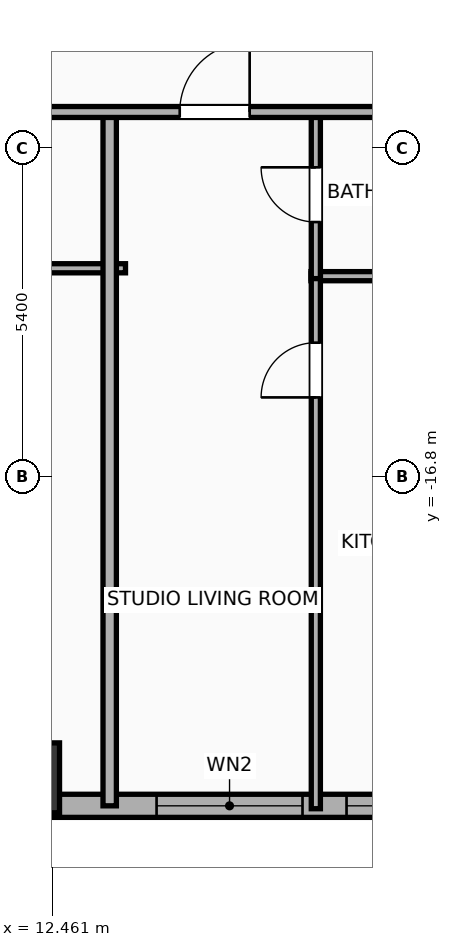
"""IFC4 building model, lengths in metres.
Left out: names, types, materials, properties, quantities, classifications, styles, units other than length and angle.
Written with IfcOpenShell. Run it as: python <this file> out.ifc"""

import sys

from ifc_helpers import new_model, si_unit, direction, frame, frame_2d, origin, origin_2d, place, context, subcontext, project, spatial, rectangle, hollow_rectangle, extrude, element, fill, save


model = new_model("IFC4")
c1 = context("Model", 3, precision=1e-05, world=origin(), true_north=direction((0.0, 1.0)))
c2 = subcontext(c1, "Body", "Model", "MODEL_VIEW")
j1 = project(units=[si_unit("LENGTHUNIT", "METRE"), si_unit("PLANEANGLEUNIT", "RADIAN")], contexts=[c1])
p1 = place(None, origin())
s1 = spatial("IfcSite", under=j1, at=p1, CompositionType="ELEMENT")
p2 = place(p1, origin())
s2 = spatial("IfcBuilding", under=s1, at=p2, CompositionType="ELEMENT")
p3 = place(p2, frame((0.0, 0.0, 29.9)))
s3 = spatial("IfcBuildingStorey", under=s2, at=p3, CompositionType="ELEMENT", Elevation=29.9)
p4 = place(p3, frame((12.0, -21.75, 0.0), z_axis=(0.0, 0.0, 1.0), x_axis=(1.0, 0.0, 0.0)))
e1 = element("IfcColumn", 1, at=p4, inside=s3, PredefinedType="COLUMN", context=c2, shape_type="SweptSolid", body=[
    extrude(hollow_rectangle(XDim=1.15, YDim=1.15, WallThickness=0.04, at=origin_2d()), origin(), (0.0, 0.0, 1.0), 3.9),
])
p5 = place(p3, frame((22.381, -22.21, 0.0), z_axis=(0.0, 0.0, 1.0), x_axis=(-1.0, 0.0, 0.0)))
e2 = element("IfcWall", 2, at=p5, inside=s3, PredefinedType="ELEMENTEDWALL", context=c2, shape_type="SweptSolid", body=[
    extrude(rectangle(XDim=51.963, YDim=0.38, at=frame_2d((25.981, 0.0))), origin(), (0.0, 0.0, 1.0), 2.54),
])
p6 = place(p5, frame((5.81, 0.0, 0.75)))
e3 = element("IfcOpeningElement", 3, at=p6, cuts=e2, PredefinedType="OPENING", context=c2, shape_type="SweptSolid", body=[
    extrude(rectangle(XDim=2.4, YDim=1.63, at=frame_2d((1.2, 0.815))), frame((0.0, 0.2, 0.0), z_axis=(0.0, -1.0, 0.0), x_axis=(1.0, 0.0, 0.0)), (0.0, 0.0, 1.0), 0.4),
])
p7 = place(p5, frame((26.431, 0.0, 0.75)))
e4 = element("IfcOpeningElement", 4, at=p7, cuts=e2, PredefinedType="OPENING", context=c2, shape_type="SweptSolid", body=[
    extrude(rectangle(XDim=2.4, YDim=1.63, at=frame_2d((1.2, 0.815))), frame((0.0, 0.2, 0.0), z_axis=(0.0, -1.0, 0.0), x_axis=(1.0, 0.0, 0.0)), (0.0, 0.0, 1.0), 0.4),
])
p8 = place(p5, frame((42.952, 0.0, 0.75)))
e5 = element("IfcOpeningElement", 5, at=p8, cuts=e2, PredefinedType="OPENING", context=c2, shape_type="SweptSolid", body=[
    extrude(rectangle(XDim=2.4, YDim=1.63, at=frame_2d((1.2, 0.815))), frame((0.0, 0.2, 0.0), z_axis=(0.0, -1.0, 0.0), x_axis=(1.0, 0.0, 0.0)), (0.0, 0.0, 1.0), 0.4),
])
p9 = place(p5, frame((49.027, 0.0, 0.75)))
e6 = element("IfcOpeningElement", 6, at=p9, cuts=e2, PredefinedType="OPENING", context=c2, shape_type="SweptSolid", body=[
    extrude(rectangle(XDim=1.2, YDim=1.63, at=frame_2d((0.6, 0.815))), frame((0.0, 0.2, 0.0), z_axis=(0.0, -1.0, 0.0), x_axis=(1.0, 0.0, 0.0)), (0.0, 0.0, 1.0), 0.4),
])
p10 = place(p5, frame((46.476, 0.0, 0.75)))
e7 = element("IfcOpeningElement", 7, at=p10, cuts=e2, PredefinedType="OPENING", context=c2, shape_type="SweptSolid", body=[
    extrude(rectangle(XDim=1.2, YDim=1.63, at=frame_2d((0.6, 0.815))), frame((0.0, 0.2, 0.0), z_axis=(0.0, -1.0, 0.0), x_axis=(1.0, 0.0, 0.0)), (0.0, 0.0, 1.0), 0.4),
])
p11 = place(p5, frame((39.181, 0.0, 0.75)))
e8 = element("IfcOpeningElement", 8, at=p11, cuts=e2, PredefinedType="OPENING", context=c2, shape_type="SweptSolid", body=[
    extrude(rectangle(XDim=1.2, YDim=1.63, at=frame_2d((0.6, 0.815))), frame((0.0, 0.2, 0.0), z_axis=(0.0, -1.0, 0.0), x_axis=(1.0, 0.0, 0.0)), (0.0, 0.0, 1.0), 0.4),
])
p12 = place(p5, frame((32.476, 0.0, 0.75)))
e9 = element("IfcOpeningElement", 9, at=p12, cuts=e2, PredefinedType="OPENING", context=c2, shape_type="SweptSolid", body=[
    extrude(rectangle(XDim=1.2, YDim=1.63, at=frame_2d((0.6, 0.815))), frame((0.0, 0.2, 0.0), z_axis=(0.0, -1.0, 0.0), x_axis=(1.0, 0.0, 0.0)), (0.0, 0.0, 1.0), 0.4),
])
p13 = place(p5, frame((35.276, 0.0, 0.75)))
e10 = element("IfcOpeningElement", 10, at=p13, cuts=e2, PredefinedType="OPENING", context=c2, shape_type="SweptSolid", body=[
    extrude(rectangle(XDim=1.2, YDim=1.63, at=frame_2d((0.6, 0.815))), frame((0.0, 0.2, 0.0), z_axis=(0.0, -1.0, 0.0), x_axis=(1.0, 0.0, 0.0)), (0.0, 0.0, 1.0), 0.4),
])
p14 = place(p5, frame((29.491, 0.0, 0.75)))
e11 = element("IfcOpeningElement", 11, at=p14, cuts=e2, PredefinedType="OPENING", context=c2, shape_type="SweptSolid", body=[
    extrude(rectangle(XDim=0.85, YDim=1.63, at=frame_2d((0.425, 0.815))), frame((0.0, 0.2, 0.0), z_axis=(0.0, -1.0, 0.0), x_axis=(1.0, 0.0, 0.0)), (0.0, 0.0, 1.0), 0.4),
])
p15 = place(p5, frame((21.596, 0.0, 0.75)))
e12 = element("IfcOpeningElement", 12, at=p15, cuts=e2, PredefinedType="OPENING", context=c2, shape_type="SweptSolid", body=[
    extrude(rectangle(XDim=1.2, YDim=1.63, at=frame_2d((0.6, 0.815))), frame((0.0, 0.2, 0.0), z_axis=(0.0, -1.0, 0.0), x_axis=(1.0, 0.0, 0.0)), (0.0, 0.0, 1.0), 0.4),
])
p16 = place(p5, frame((24.036, 0.0, 0.75)))
e13 = element("IfcOpeningElement", 13, at=p16, cuts=e2, PredefinedType="OPENING", context=c2, shape_type="SweptSolid", body=[
    extrude(rectangle(XDim=1.2, YDim=1.63, at=frame_2d((0.6, 0.815))), frame((0.0, 0.2, 0.0), z_axis=(0.0, -1.0, 0.0), x_axis=(1.0, 0.0, 0.0)), (0.0, 0.0, 1.0), 0.4),
])
p17 = place(p5, frame((17.886, 0.0, 0.75)))
e14 = element("IfcOpeningElement", 14, at=p17, cuts=e2, PredefinedType="OPENING", context=c2, shape_type="SweptSolid", body=[
    extrude(rectangle(XDim=1.2, YDim=1.63, at=frame_2d((0.6, 0.815))), frame((0.0, 0.2, 0.0), z_axis=(0.0, -1.0, 0.0), x_axis=(1.0, 0.0, 0.0)), (0.0, 0.0, 1.0), 0.4),
])
p18 = place(p5, frame((15.086, 0.0, 0.75)))
e15 = element("IfcOpeningElement", 15, at=p18, cuts=e2, PredefinedType="OPENING", context=c2, shape_type="SweptSolid", body=[
    extrude(rectangle(XDim=1.2, YDim=1.63, at=frame_2d((0.6, 0.815))), frame((0.0, 0.2, 0.0), z_axis=(0.0, -1.0, 0.0), x_axis=(1.0, 0.0, 0.0)), (0.0, 0.0, 1.0), 0.4),
])
p19 = place(p5, frame((11.181, 0.0, 0.75)))
e16 = element("IfcOpeningElement", 16, at=p19, cuts=e2, PredefinedType="OPENING", context=c2, shape_type="SweptSolid", body=[
    extrude(rectangle(XDim=1.2, YDim=1.63, at=frame_2d((0.6, 0.815))), frame((0.0, 0.2, 0.0), z_axis=(0.0, -1.0, 0.0), x_axis=(1.0, 0.0, 0.0)), (0.0, 0.0, 1.0), 0.4),
])
p20 = place(p5, frame((3.886, 0.0, 0.75)))
e17 = element("IfcOpeningElement", 17, at=p20, cuts=e2, PredefinedType="OPENING", context=c2, shape_type="SweptSolid", body=[
    extrude(rectangle(XDim=1.2, YDim=1.63, at=frame_2d((0.6, 0.815))), frame((0.0, 0.2, 0.0), z_axis=(0.0, -1.0, 0.0), x_axis=(1.0, 0.0, 0.0)), (0.0, 0.0, 1.0), 0.4),
])
p21 = place(p5, frame((1.536, 0.0, 0.75)))
e18 = element("IfcOpeningElement", 18, at=p21, cuts=e2, PredefinedType="OPENING", context=c2, shape_type="SweptSolid", body=[
    extrude(rectangle(XDim=1.2, YDim=1.63, at=frame_2d((0.6, 0.815))), frame((0.0, 0.2, 0.0), z_axis=(0.0, -1.0, 0.0), x_axis=(1.0, 0.0, 0.0)), (0.0, 0.0, 1.0), 0.4),
])
p22 = place(p3, frame((11.417, -13.37, 0.0), z_axis=(0.0, 0.0, 1.0), x_axis=(1.0, 0.0, 0.0)))
e19 = element("IfcWall", 19, at=p22, inside=s3, PredefinedType="PLUMBINGWALL", context=c2, shape_type="SweptSolid", body=[
    extrude(rectangle(XDim=2.243, YDim=0.15, at=frame_2d((1.122, 0.0))), origin(), (0.0, 0.0, 1.0), 3.65),
])
p23 = place(p3, frame((13.4, -22.21, 0.0), z_axis=(0.0, 0.0, 1.0), x_axis=(0.0, 1.0, 0.0)))
e20 = element("IfcWall", 20, at=p23, inside=s3, PredefinedType="PARTITIONING", context=c2, shape_type="SweptSolid", body=[
    extrude(rectangle(XDim=11.49, YDim=0.22, at=frame_2d((5.745, 0.0))), origin(), (0.0, 0.0, 1.0), 3.65),
])
p24 = place(p3, frame((16.71, -13.5, 0.0), z_axis=(0.0, 0.0, 1.0), x_axis=(1.0, 0.0, 0.0)))
e21 = element("IfcWall", 21, at=p24, inside=s3, PredefinedType="PLUMBINGWALL", context=c2, shape_type="SweptSolid", body=[
    extrude(rectangle(XDim=2.55, YDim=0.15, at=frame_2d((1.275, 0.0))), origin(), (0.0, 0.0, 1.0), 3.65),
])
p25 = place(p3, frame((16.79, -22.258, 0.0), z_axis=(0.0, 0.0, 1.0), x_axis=(0.0, 1.0, 0.0)))
e22 = element("IfcWall", 22, at=p25, inside=s3, PredefinedType="PLUMBINGWALL", context=c2, shape_type="SweptSolid", body=[
    extrude(rectangle(XDim=8.798, YDim=0.15, at=frame_2d((4.399, 0.0))), origin(), (0.0, 0.0, 1.0), 3.65),
])
p26 = place(p25, frame((6.764, 0.0, 0.0)))
e23 = element("IfcOpeningElement", 23, at=p26, cuts=e22, PredefinedType="OPENING", context=c2, shape_type="SweptSolid", body=[
    extrude(rectangle(XDim=0.9, YDim=2.05, at=frame_2d((0.45, 1.025))), frame((0.0, 0.085, 0.0), z_axis=(0.0, -1.0, 0.0), x_axis=(1.0, 0.0, 0.0)), (0.0, 0.0, 1.0), 0.17),
])
p27 = place(p3, frame((16.79, -13.54, 0.0), z_axis=(0.0, 0.0, 1.0), x_axis=(0.0, 1.0, 0.0)))
e24 = element("IfcWall", 24, at=p27, inside=s3, PredefinedType="PLUMBINGWALL", context=c2, shape_type="SweptSolid", body=[
    extrude(rectangle(XDim=2.76, YDim=0.15, at=frame_2d((1.38, 0.0))), origin(), (0.0, 0.0, 1.0), 3.65),
])
p28 = place(p27, frame((0.93, 0.0, 0.0)))
e25 = element("IfcOpeningElement", 25, at=p28, cuts=e24, PredefinedType="OPENING", context=c2, shape_type="SweptSolid", body=[
    extrude(rectangle(XDim=0.9, YDim=2.05, at=frame_2d((0.45, 1.025))), frame((0.0, 0.085, 0.0), z_axis=(0.0, -1.0, 0.0), x_axis=(1.0, 0.0, 0.0)), (0.0, 0.0, 1.0), 0.17),
])
p29 = place(p3, frame((-33.41, -10.8, 0.0), z_axis=(0.0, 0.0, 1.0), x_axis=(1.0, 0.0, 0.0)))
e26 = element("IfcWall", 26, at=p29, inside=s3, PredefinedType="PARTITIONING", context=c2, shape_type="SweptSolid", body=[
    extrude(rectangle(XDim=59.62, YDim=0.18, at=frame_2d((29.81, 0.0))), origin(), (0.0, 0.0, 1.0), 3.65),
])
p30 = place(p29, frame((3.36, 0.0, 0.0)))
e27 = element("IfcOpeningElement", 27, at=p30, cuts=e26, PredefinedType="OPENING", context=c2, shape_type="SweptSolid", body=[
    extrude(rectangle(XDim=1.15, YDim=2.05, at=frame_2d((0.575, 1.025))), frame((0.0, 0.1, 0.0), z_axis=(0.0, -1.0, 0.0), x_axis=(1.0, 0.0, 0.0)), (0.0, 0.0, 1.0), 0.2),
])
p31 = place(p29, frame((10.908, 0.0, 0.0)))
e28 = element("IfcOpeningElement", 28, at=p31, cuts=e26, PredefinedType="OPENING", context=c2, shape_type="SweptSolid", body=[
    extrude(rectangle(XDim=1.15, YDim=2.05, at=frame_2d((0.575, 1.025))), frame((0.0, 0.1, 0.0), z_axis=(0.0, -1.0, 0.0), x_axis=(1.0, 0.0, 0.0)), (0.0, 0.0, 1.0), 0.2),
])
p32 = place(p29, frame((15.755, 0.0, 0.0)))
e29 = element("IfcOpeningElement", 29, at=p32, cuts=e26, PredefinedType="OPENING", context=c2, shape_type="SweptSolid", body=[
    extrude(rectangle(XDim=0.9, YDim=2.05, at=frame_2d((0.45, 1.025))), frame((0.0, 0.1, 0.0), z_axis=(0.0, -1.0, 0.0), x_axis=(1.0, 0.0, 0.0)), (0.0, 0.0, 1.0), 0.2),
])
p33 = place(p29, frame((22.11, 0.0, 0.0)))
e30 = element("IfcOpeningElement", 30, at=p33, cuts=e26, PredefinedType="OPENING", context=c2, shape_type="SweptSolid", body=[
    extrude(rectangle(XDim=1.15, YDim=2.05, at=frame_2d((0.575, 1.025))), frame((0.0, 0.1, 0.0), z_axis=(0.0, -1.0, 0.0), x_axis=(1.0, 0.0, 0.0)), (0.0, 0.0, 1.0), 0.2),
])
p34 = place(p29, frame((27.709, 0.0, 0.0)))
e31 = element("IfcOpeningElement", 31, at=p34, cuts=e26, PredefinedType="OPENING", context=c2, shape_type="SweptSolid", body=[
    extrude(rectangle(XDim=1.15, YDim=2.05, at=frame_2d((0.575, 1.025))), frame((0.0, 0.1, 0.0), z_axis=(0.0, -1.0, 0.0), x_axis=(1.0, 0.0, 0.0)), (0.0, 0.0, 1.0), 0.2),
])
p35 = place(p29, frame((33.349, 0.0, 0.0)))
e32 = element("IfcOpeningElement", 32, at=p35, cuts=e26, PredefinedType="OPENING", context=c2, shape_type="SweptSolid", body=[
    extrude(rectangle(XDim=1.15, YDim=2.05, at=frame_2d((0.575, 1.025))), frame((0.0, 0.1, 0.0), z_axis=(0.0, -1.0, 0.0), x_axis=(1.0, 0.0, 0.0)), (0.0, 0.0, 1.0), 0.2),
])
p36 = place(p29, frame((36.759, 0.0, 0.0)))
e33 = element("IfcOpeningElement", 33, at=p36, cuts=e26, PredefinedType="OPENING", context=c2, shape_type="SweptSolid", body=[
    extrude(rectangle(XDim=1.15, YDim=2.05, at=frame_2d((0.575, 1.025))), frame((0.0, 0.1, 0.0), z_axis=(0.0, -1.0, 0.0), x_axis=(1.0, 0.0, 0.0)), (0.0, 0.0, 1.0), 0.2),
])
p37 = place(p29, frame((43.752, 0.0, 0.0)))
e34 = element("IfcOpeningElement", 34, at=p37, cuts=e26, PredefinedType="OPENING", context=c2, shape_type="SweptSolid", body=[
    extrude(rectangle(XDim=0.9, YDim=2.05, at=frame_2d((0.45, 1.025))), frame((0.0, 0.1, 0.0), z_axis=(0.0, -1.0, 0.0), x_axis=(1.0, 0.0, 0.0)), (0.0, 0.0, 1.0), 0.2),
])
p38 = place(p29, frame((47.962, 0.0, 0.0)))
e35 = element("IfcOpeningElement", 35, at=p38, cuts=e26, PredefinedType="OPENING", context=c2, shape_type="SweptSolid", body=[
    extrude(rectangle(XDim=1.15, YDim=2.05, at=frame_2d((0.575, 1.025))), frame((0.0, 0.1, 0.0), z_axis=(0.0, -1.0, 0.0), x_axis=(1.0, 0.0, 0.0)), (0.0, 0.0, 1.0), 0.2),
])
p39 = place(p29, frame((55.641, 0.0, 0.0)))
e36 = element("IfcOpeningElement", 36, at=p39, cuts=e26, PredefinedType="OPENING", context=c2, shape_type="SweptSolid", body=[
    extrude(rectangle(XDim=1.15, YDim=2.05, at=frame_2d((0.575, 1.025))), frame((0.0, 0.1, 0.0), z_axis=(0.0, -1.0, 0.0), x_axis=(1.0, 0.0, 0.0)), (0.0, 0.0, 1.0), 0.2),
])
p40 = place(p6, origin())
e37 = element("IfcWindow", 37, at=p40, inside=s3, PartitioningType="SINGLE_PANEL", PredefinedType="WINDOW", context=c2, shape_type="SweptSolid", body=[
    extrude(rectangle(XDim=2.4, YDim=1.63, at=frame_2d((1.2, 0.815))), frame((0.0, 0.03, 0.0), z_axis=(0.0, -1.0, 0.0), x_axis=(1.0, 0.0, 0.0)), (0.0, 0.0, 1.0), 0.06),
])
fill(e3, e37)
p41 = place(p20, origin())
e38 = element("IfcWindow", 38, at=p41, inside=s3, PartitioningType="SINGLE_PANEL", PredefinedType="WINDOW", context=c2, shape_type="SweptSolid", body=[
    extrude(rectangle(XDim=1.2, YDim=1.63, at=frame_2d((0.6, 0.815))), frame((0.0, 0.03, 0.0), z_axis=(0.0, -1.0, 0.0), x_axis=(1.0, 0.0, 0.0)), (0.0, 0.0, 1.0), 0.06),
])
fill(e17, e38)
p42 = place(p26, origin())
e39 = element("IfcDoor", 39, at=p42, inside=s3, OperationType="SINGLE_SWING_LEFT", PredefinedType="DOOR", context=c2, shape_type="SweptSolid", body=[
    extrude(rectangle(XDim=0.9, YDim=2.05, at=frame_2d((0.45, 1.025))), frame((0.0, 0.025, 0.0), z_axis=(0.0, -1.0, 0.0), x_axis=(1.0, 0.0, 0.0)), (0.0, 0.0, 1.0), 0.05),
])
fill(e23, e39)
p43 = place(p28, origin())
e40 = element("IfcDoor", 40, at=p43, inside=s3, OperationType="SINGLE_SWING_RIGHT", PredefinedType="DOOR", context=c2, shape_type="SweptSolid", body=[
    extrude(rectangle(XDim=0.9, YDim=2.05, at=frame_2d((0.45, 1.025))), frame((0.0, 0.025, 0.0), z_axis=(0.0, -1.0, 0.0), x_axis=(1.0, 0.0, 0.0)), (0.0, 0.0, 1.0), 0.05),
])
fill(e25, e40)
p44 = place(p38, origin())
e41 = element("IfcDoor", 41, at=p44, inside=s3, OperationType="SINGLE_SWING_RIGHT", PredefinedType="DOOR", context=c2, shape_type="SweptSolid", body=[
    extrude(rectangle(XDim=1.15, YDim=2.05, at=frame_2d((0.575, 1.025))), frame((0.0, 0.025, 0.0), z_axis=(0.0, -1.0, 0.0), x_axis=(1.0, 0.0, 0.0)), (0.0, 0.0, 1.0), 0.05),
])
fill(e35, e41)
save(model, sys.argv[1])
